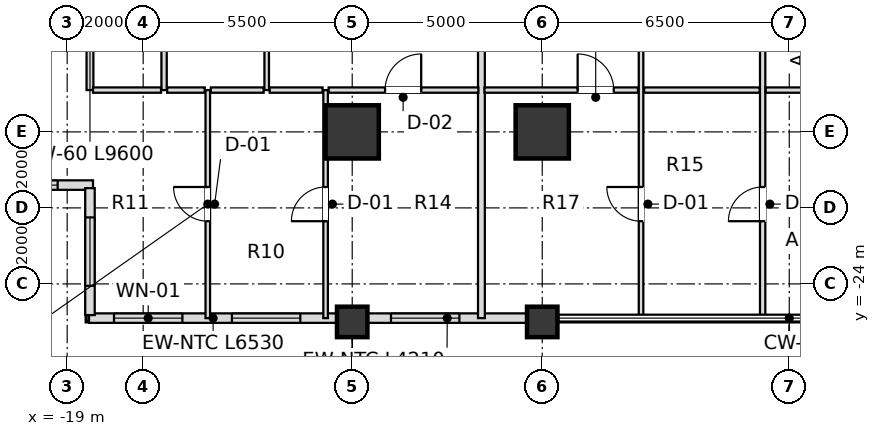
"""IFC4 building model, lengths in metres.
Left out: names, types, materials, properties, quantities, classifications, styles, units other than length and angle.
Written with IfcOpenShell. Run it as: python <this file> out.ifc"""

import sys

from ifc_helpers import new_model, si_unit, direction, frame, frame_2d, origin, origin_2d, place, context, subcontext, project, spatial, rectangle, extrude, element, fill, save


model = new_model("IFC4")
c1 = context("Model", 3, precision=1e-05, world=origin(), true_north=direction((0.0, 1.0)))
c2 = subcontext(c1, "Body", "Model", "MODEL_VIEW")
j1 = project(units=[si_unit("LENGTHUNIT", "METRE"), si_unit("PLANEANGLEUNIT", "RADIAN")], contexts=[c1])
p1 = place(None, origin())
s1 = spatial("IfcSite", under=j1, at=p1, CompositionType="ELEMENT")
p2 = place(p1, origin())
s2 = spatial("IfcBuilding", under=s1, at=p2, CompositionType="ELEMENT")
p3 = place(p2, frame((0.0, 0.0, 27.6)))
s3 = spatial("IfcBuildingStorey", under=s2, at=p3, CompositionType="ELEMENT", Elevation=27.6)
for number, where, z_axis, x_axis in (
    (1, (-11.5, -20.0, 0.0), (0.0, 0.0, 1.0), (1.0, 0.0, 0.0)),
    (2, (-6.5, -20.0, 0.0), (0.0, 0.0, 1.0), (1.0, 0.0, 0.0)),
):
    element("IfcColumn", number, at=place(p3, frame(where, z_axis=z_axis, x_axis=x_axis)), inside=s3, PredefinedType="USERDEFINED", context=c2, shape_type="SweptSolid", body=[
        extrude(rectangle(XDim=1.4, YDim=1.4, at=origin_2d()), origin(), (0.0, 0.0, 1.0), 4.8),
    ])
for number, where, z_axis, x_axis in (
    (3, (-11.5, -25.0, 0.0), (0.0, 0.0, 1.0), (1.0, 0.0, 0.0)),
    (4, (-6.5, -25.0, 0.0), (0.0, 0.0, 1.0), (1.0, 0.0, 0.0)),
):
    element("IfcColumn", number, at=place(p3, frame(where, z_axis=z_axis, x_axis=x_axis)), inside=s3, PredefinedType="COLUMN", context=c2, shape_type="SweptSolid", body=[
        extrude(rectangle(XDim=0.8, YDim=0.8, at=origin_2d()), origin(), (0.0, 0.0, 1.0), 4.8),
    ])
p4 = place(p3, frame((-18.425, -24.9, 0.0), z_axis=(0.0, 0.0, 1.0), x_axis=(1.0, 0.0, 0.0)))
e5 = element("IfcWall", 5, at=p4, inside=s3, PredefinedType="SOLIDWALL", context=c2, shape_type="SweptSolid", body=[
    extrude(rectangle(XDim=6.53, YDim=0.25, at=frame_2d((3.265, 0.0))), origin(), (0.0, 0.0, 1.0), 3.936),
])
p5 = place(p4, frame((0.657, 0.0, 0.72)))
e6 = element("IfcOpeningElement", 6, at=p5, cuts=e5, PredefinedType="OPENING", context=c2, shape_type="SweptSolid", body=[
    extrude(rectangle(XDim=1.8, YDim=1.68, at=frame_2d((0.9, 0.84))), frame((0.0, 0.135, 0.0), z_axis=(0.0, -1.0, 0.0), x_axis=(1.0, 0.0, 0.0)), (0.0, 0.0, 1.0), 0.27),
])
p6 = place(p4, frame((3.76, 0.0, 0.72)))
e7 = element("IfcOpeningElement", 7, at=p6, cuts=e5, PredefinedType="OPENING", context=c2, shape_type="SweptSolid", body=[
    extrude(rectangle(XDim=1.8, YDim=1.68, at=frame_2d((0.9, 0.84))), frame((0.0, 0.135, 0.0), z_axis=(0.0, -1.0, 0.0), x_axis=(1.0, 0.0, 0.0)), (0.0, 0.0, 1.0), 0.27),
])
p7 = place(p3, frame((-11.105, -24.9, 0.0), z_axis=(0.0, 0.0, 1.0), x_axis=(1.0, 0.0, 0.0)))
e8 = element("IfcWall", 8, at=p7, inside=s3, PredefinedType="SOLIDWALL", context=c2, shape_type="SweptSolid", body=[
    extrude(rectangle(XDim=4.21, YDim=0.25, at=frame_2d((2.105, 0.0))), origin(), (0.0, 0.0, 1.0), 3.936),
])
p8 = place(p7, frame((0.625, 0.0, 0.72)))
e9 = element("IfcOpeningElement", 9, at=p8, cuts=e8, PredefinedType="OPENING", context=c2, shape_type="SweptSolid", body=[
    extrude(rectangle(XDim=1.8, YDim=1.68, at=frame_2d((0.9, 0.84))), frame((0.0, 0.135, 0.0), z_axis=(0.0, -1.0, 0.0), x_axis=(1.0, 0.0, 0.0)), (0.0, 0.0, 1.0), 0.27),
])
p9 = place(p3, frame((-21.98, -21.4, 0.0), z_axis=(0.0, 0.0, 1.0), x_axis=(1.0, 0.0, 0.0)))
e10 = element("IfcWall", 10, at=p9, inside=s3, PredefinedType="SOLIDWALL", context=c2, shape_type="SweptSolid", body=[
    extrude(rectangle(XDim=3.66, YDim=0.25, at=frame_2d((1.83, 0.0))), origin(), (0.0, 0.0, 1.0), 3.936),
])
p10 = place(p9, frame((0.93, 0.0, 0.72)))
e11 = element("IfcOpeningElement", 11, at=p10, cuts=e10, PredefinedType="OPENING", context=c2, shape_type="SweptSolid", body=[
    extrude(rectangle(XDim=1.8, YDim=1.68, at=frame_2d((0.9, 0.84))), frame((0.0, 0.135, 0.0), z_axis=(0.0, -1.0, 0.0), x_axis=(1.0, 0.0, 0.0)), (0.0, 0.0, 1.0), 0.27),
])
p11 = place(p3, frame((-18.4, -21.48, 0.0), z_axis=(0.0, 0.0, 1.0), x_axis=(0.0, -1.0, 0.0)))
e12 = element("IfcWall", 12, at=p11, inside=s3, PredefinedType="SOLIDWALL", context=c2, shape_type="SweptSolid", body=[
    extrude(rectangle(XDim=3.34, YDim=0.25, at=frame_2d((1.67, 0.0))), origin(), (0.0, 0.0, 1.0), 3.936),
])
p12 = place(p11, frame((0.77, 0.0, 0.72)))
e13 = element("IfcOpeningElement", 13, at=p12, cuts=e12, PredefinedType="OPENING", context=c2, shape_type="SweptSolid", body=[
    extrude(rectangle(XDim=1.8, YDim=1.68, at=frame_2d((0.9, 0.84))), frame((0.0, 0.135, 0.0), z_axis=(0.0, -1.0, 0.0), x_axis=(1.0, 0.0, 0.0)), (0.0, 0.0, 1.0), 0.27),
])
p13 = place(p3, frame((-18.4, -18.9, 0.0), z_axis=(0.0, 0.0, 1.0), x_axis=(0.0, 1.0, 0.0)))
e14 = element("IfcWall", 14, at=p13, inside=s3, PredefinedType="PARTITIONING", context=c2, shape_type="SweptSolid", body=[
    extrude(rectangle(XDim=9.6, YDim=0.18, at=frame_2d((4.8, 0.0))), origin(), (0.0, 0.0, 1.0), 3.936),
])
p14 = place(p3, frame((-16.45, -18.9, 0.0), z_axis=(0.0, 0.0, 1.0), x_axis=(0.0, 1.0, 0.0)))
e15 = element("IfcWall", 15, at=p14, inside=s3, PredefinedType="PARTITIONING", context=c2, shape_type="SweptSolid", body=[
    extrude(rectangle(XDim=9.6, YDim=0.14, at=frame_2d((4.8, 0.0))), origin(), (0.0, 0.0, 1.0), 3.936),
])
p15 = place(p14, frame((4.222, 0.0, 0.0)))
e16 = element("IfcOpeningElement", 16, at=p15, cuts=e15, PredefinedType="OPENING", context=c2, shape_type="SweptSolid", body=[
    extrude(rectangle(XDim=0.9, YDim=2.1, at=frame_2d((0.45, 1.05))), frame((0.0, 0.08, 0.0), z_axis=(0.0, -1.0, 0.0), x_axis=(1.0, 0.0, 0.0)), (0.0, 0.0, 1.0), 0.16),
])
p16 = place(p3, frame((-15.3, -24.9, 0.0), z_axis=(0.0, 0.0, 1.0), x_axis=(0.0, 1.0, 0.0)))
e17 = element("IfcWall", 17, at=p16, inside=s3, PredefinedType="PARTITIONING", context=c2, shape_type="SweptSolid", body=[
    extrude(rectangle(XDim=6.0, YDim=0.12, at=frame_2d((3.0, 0.0))), origin(), (0.0, 0.0, 1.0), 3.936),
])
p17 = place(p16, frame((2.55, 0.0, 0.0)))
e18 = element("IfcOpeningElement", 18, at=p17, cuts=e17, PredefinedType="OPENING", context=c2, shape_type="SweptSolid", body=[
    extrude(rectangle(XDim=0.9, YDim=2.1, at=frame_2d((0.45, 1.05))), frame((0.0, 0.07, 0.0), z_axis=(0.0, -1.0, 0.0), x_axis=(1.0, 0.0, 0.0)), (0.0, 0.0, 1.0), 0.14),
])
p18 = place(p3, frame((-13.75, -18.9, 0.0), z_axis=(0.0, 0.0, 1.0), x_axis=(0.0, 1.0, 0.0)))
e19 = element("IfcWall", 19, at=p18, inside=s3, PredefinedType="PARTITIONING", context=c2, shape_type="SweptSolid", body=[
    extrude(rectangle(XDim=9.6, YDim=0.12, at=frame_2d((4.8, 0.0))), origin(), (0.0, 0.0, 1.0), 3.936),
])
p19 = place(p18, frame((4.325, 0.0, 0.0)))
e20 = element("IfcOpeningElement", 20, at=p19, cuts=e19, PredefinedType="OPENING", context=c2, shape_type="SweptSolid", body=[
    extrude(rectangle(XDim=0.95, YDim=2.1, at=frame_2d((0.475, 1.05))), frame((0.0, 0.07, 0.0), z_axis=(0.0, -1.0, 0.0), x_axis=(1.0, 0.0, 0.0)), (0.0, 0.0, 1.0), 0.14),
])
p20 = place(p3, frame((-12.2, -24.9, 0.0), z_axis=(0.0, 0.0, 1.0), x_axis=(0.0, 1.0, 0.0)))
e21 = element("IfcWall", 21, at=p20, inside=s3, PredefinedType="PARTITIONING", context=c2, shape_type="SweptSolid", body=[
    extrude(rectangle(XDim=6.0, YDim=0.12, at=frame_2d((3.0, 0.0))), origin(), (0.0, 0.0, 1.0), 3.936),
])
p21 = place(p20, frame((2.55, 0.0, 0.0)))
e22 = element("IfcOpeningElement", 22, at=p21, cuts=e21, PredefinedType="OPENING", context=c2, shape_type="SweptSolid", body=[
    extrude(rectangle(XDim=0.9, YDim=2.1, at=frame_2d((0.45, 1.05))), frame((0.0, 0.07, 0.0), z_axis=(0.0, -1.0, 0.0), x_axis=(1.0, 0.0, 0.0)), (0.0, 0.0, 1.0), 0.14),
])
p22 = place(p3, frame((-8.1, -24.9, 0.0), z_axis=(0.0, 0.0, 1.0), x_axis=(0.0, 1.0, 0.0)))
e23 = element("IfcWall", 23, at=p22, inside=s3, PredefinedType="PARTITIONING", context=c2, shape_type="SweptSolid", body=[
    extrude(rectangle(XDim=15.6, YDim=0.18, at=frame_2d((7.8, 0.0))), origin(), (0.0, 0.0, 1.0), 4.016),
])
p23 = place(p3, frame((-3.9, -24.9, 0.0), z_axis=(0.0, 0.0, 1.0), x_axis=(0.0, 1.0, 0.0)))
e24 = element("IfcWall", 24, at=p23, inside=s3, PredefinedType="PARTITIONING", context=c2, shape_type="SweptSolid", body=[
    extrude(rectangle(XDim=15.6, YDim=0.12, at=frame_2d((7.8, 0.0))), origin(), (0.0, 0.0, 1.0), 4.016),
])
p24 = place(p23, frame((10.325, 0.0, 0.0)))
e25 = element("IfcOpeningElement", 25, at=p24, cuts=e24, PredefinedType="OPENING", context=c2, shape_type="SweptSolid", body=[
    extrude(rectangle(XDim=0.95, YDim=2.1, at=frame_2d((0.475, 1.05))), frame((0.0, 0.07, 0.0), z_axis=(0.0, -1.0, 0.0), x_axis=(1.0, 0.0, 0.0)), (0.0, 0.0, 1.0), 0.14),
])
p25 = place(p23, frame((2.55, 0.0, 0.0)))
e26 = element("IfcOpeningElement", 26, at=p25, cuts=e24, PredefinedType="OPENING", context=c2, shape_type="SweptSolid", body=[
    extrude(rectangle(XDim=0.9, YDim=2.1, at=frame_2d((0.45, 1.05))), frame((0.0, 0.07, 0.0), z_axis=(0.0, -1.0, 0.0), x_axis=(1.0, 0.0, 0.0)), (0.0, 0.0, 1.0), 0.14),
])
p26 = place(p3, frame((-0.7, -24.9, 0.0), z_axis=(0.0, 0.0, 1.0), x_axis=(0.0, 1.0, 0.0)))
e27 = element("IfcWall", 27, at=p26, inside=s3, PredefinedType="PARTITIONING", context=c2, shape_type="SweptSolid", body=[
    extrude(rectangle(XDim=15.6, YDim=0.14, at=frame_2d((7.8, 0.0))), origin(), (0.0, 0.0, 1.0), 4.016),
])
p27 = place(p26, frame((10.35, 0.0, 0.0)))
e28 = element("IfcOpeningElement", 28, at=p27, cuts=e27, PredefinedType="OPENING", context=c2, shape_type="SweptSolid", body=[
    extrude(rectangle(XDim=0.9, YDim=2.1, at=frame_2d((0.45, 1.05))), frame((0.0, 0.08, 0.0), z_axis=(0.0, -1.0, 0.0), x_axis=(1.0, 0.0, 0.0)), (0.0, 0.0, 1.0), 0.16),
])
p28 = place(p26, frame((2.55, 0.0, 0.0)))
e29 = element("IfcOpeningElement", 29, at=p28, cuts=e27, PredefinedType="OPENING", context=c2, shape_type="SweptSolid", body=[
    extrude(rectangle(XDim=0.9, YDim=2.1, at=frame_2d((0.45, 1.05))), frame((0.0, 0.08, 0.0), z_axis=(0.0, -1.0, 0.0), x_axis=(1.0, 0.0, 0.0)), (0.0, 0.0, 1.0), 0.16),
])
p29 = place(p3, frame((-18.32, -18.9, 0.0), z_axis=(0.0, 0.0, 1.0), x_axis=(1.0, 0.0, 0.0)))
e30 = element("IfcWall", 30, at=p29, inside=s3, PredefinedType="PARTITIONING", context=c2, shape_type="SweptSolid", body=[
    extrude(rectangle(XDim=1.79, YDim=0.14, at=frame_2d((0.895, 0.0))), origin(), (0.0, 0.0, 1.0), 3.936),
])
p30 = place(p3, frame((-16.37, -18.9, 0.0), z_axis=(0.0, 0.0, 1.0), x_axis=(1.0, 0.0, 0.0)))
e31 = element("IfcWall", 31, at=p30, inside=s3, PredefinedType="PARTITIONING", context=c2, shape_type="SweptSolid", body=[
    extrude(rectangle(XDim=0.99, YDim=0.14, at=frame_2d((0.495, 0.0))), origin(), (0.0, 0.0, 1.0), 3.936),
])
for number, where, z_axis, x_axis in (
    (32, (-15.22, -18.9, 0.0), (0.0, 0.0, 1.0), (1.0, 0.0, 0.0)),
    (33, (-13.67, -18.9, 0.0), (0.0, 0.0, 1.0), (1.0, 0.0, 0.0)),
):
    element("IfcWall", number, at=place(p3, frame(where, z_axis=z_axis, x_axis=x_axis)), inside=s3, PredefinedType="PARTITIONING", context=c2, shape_type="SweptSolid", body=[
        extrude(rectangle(XDim=1.39, YDim=0.14, at=frame_2d((0.695, 0.0))), origin(), (0.0, 0.0, 1.0), 3.936),
    ])
p31 = place(p3, frame((-12.12, -18.9, 0.0), z_axis=(0.0, 0.0, 1.0), x_axis=(1.0, 0.0, 0.0)))
e34 = element("IfcWall", 34, at=p31, inside=s3, PredefinedType="PARTITIONING", context=c2, shape_type="SweptSolid", body=[
    extrude(rectangle(XDim=3.94, YDim=0.14, at=frame_2d((1.97, 0.0))), origin(), (0.0, 0.0, 1.0), 3.936),
])
p32 = place(p31, frame((1.485, 0.0, 0.0)))
e35 = element("IfcOpeningElement", 35, at=p32, cuts=e34, PredefinedType="OPENING", context=c2, shape_type="SweptSolid", body=[
    extrude(rectangle(XDim=0.95, YDim=2.1, at=frame_2d((0.475, 1.05))), frame((0.0, 0.08, 0.0), z_axis=(0.0, -1.0, 0.0), x_axis=(1.0, 0.0, 0.0)), (0.0, 0.0, 1.0), 0.16),
])
p33 = place(p3, frame((-8.02, -18.9, 0.0), z_axis=(0.0, 0.0, 1.0), x_axis=(1.0, 0.0, 0.0)))
e36 = element("IfcWall", 36, at=p33, inside=s3, PredefinedType="PARTITIONING", context=c2, shape_type="SweptSolid", body=[
    extrude(rectangle(XDim=4.04, YDim=0.14, at=frame_2d((2.02, 0.0))), origin(), (0.0, 0.0, 1.0), 4.016),
])
p34 = place(p33, frame((2.452, 0.0, 0.0)))
e37 = element("IfcOpeningElement", 37, at=p34, cuts=e36, PredefinedType="OPENING", context=c2, shape_type="SweptSolid", body=[
    extrude(rectangle(XDim=0.95, YDim=2.1, at=frame_2d((0.475, 1.05))), frame((0.0, 0.08, 0.0), z_axis=(0.0, -1.0, 0.0), x_axis=(1.0, 0.0, 0.0)), (0.0, 0.0, 1.0), 0.16),
])
p35 = place(p3, frame((-3.82, -18.9, 0.0), z_axis=(0.0, 0.0, 1.0), x_axis=(1.0, 0.0, 0.0)))
e38 = element("IfcWall", 38, at=p35, inside=s3, PredefinedType="PARTITIONING", context=c2, shape_type="SweptSolid", body=[
    extrude(rectangle(XDim=3.04, YDim=0.14, at=frame_2d((1.52, 0.0))), origin(), (0.0, 0.0, 1.0), 4.58),
])
p36 = place(p3, frame((-0.62, -18.9, 0.0), z_axis=(0.0, 0.0, 1.0), x_axis=(1.0, 0.0, 0.0)))
e39 = element("IfcWall", 39, at=p36, inside=s3, PredefinedType="PARTITIONING", context=c2, shape_type="SweptSolid", body=[
    extrude(rectangle(XDim=1.79, YDim=0.14, at=frame_2d((0.895, 0.0))), origin(), (0.0, 0.0, 1.0), 4.58),
])
p37 = place(p5, origin())
e40 = element("IfcWindow", 40, at=p37, inside=s3, PartitioningType="SINGLE_PANEL", PredefinedType="WINDOW", context=c2, shape_type="SweptSolid", body=[
    extrude(rectangle(XDim=1.8, YDim=1.68, at=frame_2d((0.9, 0.84))), frame((0.0, 0.03, 0.0), z_axis=(0.0, -1.0, 0.0), x_axis=(1.0, 0.0, 0.0)), (0.0, 0.0, 1.0), 0.06),
])
fill(e6, e40)
p38 = place(p6, origin())
e41 = element("IfcWindow", 41, at=p38, inside=s3, PartitioningType="SINGLE_PANEL", PredefinedType="WINDOW", context=c2, shape_type="SweptSolid", body=[
    extrude(rectangle(XDim=1.8, YDim=1.68, at=frame_2d((0.9, 0.84))), frame((0.0, 0.03, 0.0), z_axis=(0.0, -1.0, 0.0), x_axis=(1.0, 0.0, 0.0)), (0.0, 0.0, 1.0), 0.06),
])
fill(e7, e41)
p39 = place(p8, origin())
e42 = element("IfcWindow", 42, at=p39, inside=s3, PartitioningType="SINGLE_PANEL", PredefinedType="WINDOW", context=c2, shape_type="SweptSolid", body=[
    extrude(rectangle(XDim=1.8, YDim=1.68, at=frame_2d((0.9, 0.84))), frame((0.0, 0.03, 0.0), z_axis=(0.0, -1.0, 0.0), x_axis=(1.0, 0.0, 0.0)), (0.0, 0.0, 1.0), 0.06),
])
fill(e9, e42)
p40 = place(p10, origin())
e43 = element("IfcWindow", 43, at=p40, inside=s3, PartitioningType="SINGLE_PANEL", PredefinedType="WINDOW", context=c2, shape_type="SweptSolid", body=[
    extrude(rectangle(XDim=1.8, YDim=1.68, at=frame_2d((0.9, 0.84))), frame((0.0, 0.03, 0.0), z_axis=(0.0, -1.0, 0.0), x_axis=(1.0, 0.0, 0.0)), (0.0, 0.0, 1.0), 0.06),
])
fill(e11, e43)
p41 = place(p12, origin())
e44 = element("IfcWindow", 44, at=p41, inside=s3, PartitioningType="SINGLE_PANEL", PredefinedType="WINDOW", context=c2, shape_type="SweptSolid", body=[
    extrude(rectangle(XDim=1.8, YDim=1.68, at=frame_2d((0.9, 0.84))), frame((0.0, 0.03, 0.0), z_axis=(0.0, -1.0, 0.0), x_axis=(1.0, 0.0, 0.0)), (0.0, 0.0, 1.0), 0.06),
])
fill(e13, e44)
p42 = place(p32, origin())
e45 = element("IfcDoor", 45, at=p42, inside=s3, OperationType="SINGLE_SWING_RIGHT", PredefinedType="DOOR", context=c2, shape_type="SweptSolid", body=[
    extrude(rectangle(XDim=0.95, YDim=2.1, at=frame_2d((0.475, 1.05))), frame((0.0, 0.025, 0.0), z_axis=(0.0, -1.0, 0.0), x_axis=(1.0, 0.0, 0.0)), (0.0, 0.0, 1.0), 0.05),
])
fill(e35, e45)
p43 = place(p21, origin())
e46 = element("IfcDoor", 46, at=p43, inside=s3, OperationType="SINGLE_SWING_LEFT", PredefinedType="DOOR", context=c2, shape_type="SweptSolid", body=[
    extrude(rectangle(XDim=0.9, YDim=2.1, at=frame_2d((0.45, 1.05))), frame((0.0, 0.025, 0.0), z_axis=(0.0, -1.0, 0.0), x_axis=(1.0, 0.0, 0.0)), (0.0, 0.0, 1.0), 0.05),
])
fill(e22, e46)
p44 = place(p17, origin())
e47 = element("IfcDoor", 47, at=p44, inside=s3, OperationType="SINGLE_SWING_RIGHT", PredefinedType="DOOR", context=c2, shape_type="SweptSolid", body=[
    extrude(rectangle(XDim=0.9, YDim=2.1, at=frame_2d((0.45, 1.05))), frame((0.0, 0.025, 0.0), z_axis=(0.0, -1.0, 0.0), x_axis=(1.0, 0.0, 0.0)), (0.0, 0.0, 1.0), 0.05),
])
fill(e18, e47)
p45 = place(p34, origin())
e48 = element("IfcDoor", 48, at=p45, inside=s3, OperationType="SINGLE_SWING_LEFT", PredefinedType="DOOR", context=c2, shape_type="SweptSolid", body=[
    extrude(rectangle(XDim=0.95, YDim=2.1, at=frame_2d((0.475, 1.05))), frame((0.0, 0.025, 0.0), z_axis=(0.0, -1.0, 0.0), x_axis=(1.0, 0.0, 0.0)), (0.0, 0.0, 1.0), 0.05),
])
fill(e37, e48)
p46 = place(p25, origin())
e49 = element("IfcDoor", 49, at=p46, inside=s3, OperationType="SINGLE_SWING_RIGHT", PredefinedType="DOOR", context=c2, shape_type="SweptSolid", body=[
    extrude(rectangle(XDim=0.9, YDim=2.1, at=frame_2d((0.45, 1.05))), frame((0.0, 0.025, 0.0), z_axis=(0.0, -1.0, 0.0), x_axis=(1.0, 0.0, 0.0)), (0.0, 0.0, 1.0), 0.05),
])
fill(e26, e49)
p47 = place(p28, origin())
e50 = element("IfcDoor", 50, at=p47, inside=s3, OperationType="SINGLE_SWING_LEFT", PredefinedType="DOOR", context=c2, shape_type="SweptSolid", body=[
    extrude(rectangle(XDim=0.9, YDim=2.1, at=frame_2d((0.45, 1.05))), frame((0.0, 0.025, 0.0), z_axis=(0.0, -1.0, 0.0), x_axis=(1.0, 0.0, 0.0)), (0.0, 0.0, 1.0), 0.05),
])
fill(e29, e50)
save(model, sys.argv[1])
